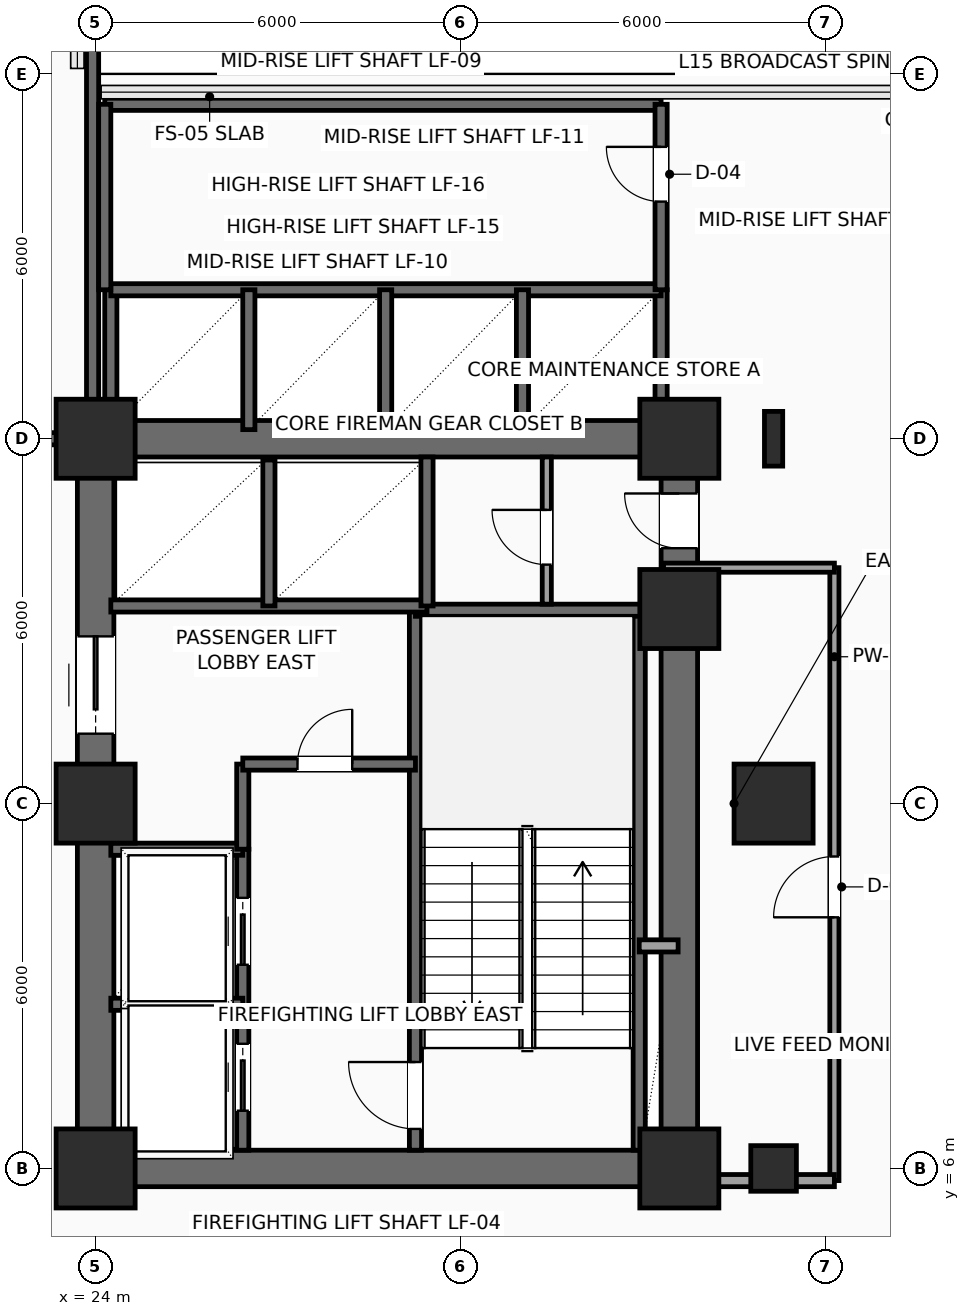
"""IFC4 building model, lengths in metres.
Left out: names, types, materials, properties, quantities, classifications, styles, units other than length and angle.
Written with IfcOpenShell. Run it as: python <this file> out.ifc"""

import sys

from ifc_helpers import new_model, si_unit, direction, frame, frame_2d, origin, origin_2d, place, context, subcontext, project, spatial, rectangle, hollow_rectangle, i_section, extrude, element, fill, save


model = new_model("IFC4")
c1 = context("Model", 3, precision=1e-05, world=origin(), true_north=direction((0.0, 1.0)))
c2 = subcontext(c1, "Body", "Model", "MODEL_VIEW")
j1 = project(units=[si_unit("LENGTHUNIT", "METRE"), si_unit("PLANEANGLEUNIT", "RADIAN")], contexts=[c1])
p1 = place(None, origin())
s1 = spatial("IfcSite", under=j1, at=p1, CompositionType="ELEMENT")
p2 = place(p1, origin())
s2 = spatial("IfcBuilding", under=s1, at=p2, CompositionType="ELEMENT")
p3 = place(p2, frame((0.0, 0.0, 67.5)))
s3 = spatial("IfcBuildingStorey", under=s2, at=p3, CompositionType="ELEMENT", Elevation=67.5)
for number, where, z_axis, x_axis in (
    (1, (24.0, 6.0, 0.0), (0.0, 0.0, 1.0), (1.0, 0.0, 0.0)),
    (2, (24.0, 12.0, 0.0), (0.0, 0.0, 1.0), (1.0, 0.0, 0.0)),
    (3, (24.0, 18.0, 0.0), (0.0, 0.0, 1.0), (1.0, 0.0, 0.0)),
    (4, (33.6, 6.0, 0.0), (0.0, 0.0, 1.0), (1.0, 0.0, 0.0)),
    (5, (33.6, 15.2, 0.0), (0.0, 0.0, 1.0), (1.0, 0.0, 0.0)),
    (6, (33.6, 18.0, 0.0), (0.0, 0.0, 1.0), (1.0, 0.0, 0.0)),
):
    element("IfcColumn", number, at=place(p3, frame(where, z_axis=z_axis, x_axis=x_axis)), inside=s3, PredefinedType="COLUMN", context=c2, shape_type="SweptSolid", body=[
        extrude(rectangle(XDim=1.3, YDim=1.3, at=origin_2d()), origin(), (0.0, 0.0, 1.0), 3.9),
    ])
p4 = place(p3, frame((35.15, 6.0, 0.0), z_axis=(0.0, 0.0, 1.0), x_axis=(1.0, 0.0, 0.0)))
e7 = element("IfcColumn", 7, at=p4, inside=s3, PredefinedType="COLUMN", context=c2, shape_type="SweptSolid", body=[
    extrude(hollow_rectangle(XDim=0.75, YDim=0.75, WallThickness=0.035, InnerFilletRadius=0.035, OuterFilletRadius=0.05, at=origin_2d()), origin(), (0.0, 0.0, 1.0), 3.9),
])
p5 = place(p3, frame((35.15, 12.0, 0.0), z_axis=(0.0, 0.0, 1.0), x_axis=(1.0, 0.0, 0.0)))
e8 = element("IfcColumn", 8, at=p5, inside=s3, PredefinedType="COLUMN", context=c2, shape_type="SweptSolid", body=[
    extrude(rectangle(XDim=1.3, YDim=1.3, at=origin_2d()), origin(), (0.0, 0.0, 1.0), 3.9),
])
p6 = place(p3, frame((35.15, 18.0, 0.0), z_axis=(0.0, 0.0, 1.0), x_axis=(1.0, 0.0, 0.0)))
e9 = element("IfcColumn", 9, at=p6, inside=s3, PredefinedType="COLUMN", context=c2, shape_type="SweptSolid", body=[
    extrude(i_section(OverallWidth=0.3, OverallDepth=0.9, WebThickness=0.019, FlangeThickness=0.035, FilletRadius=0.03, at=origin_2d()), origin(), (0.0, 0.0, 1.0), 3.9),
])
for number, where, z_axis, x_axis in (
    (10, (24.0, 6.0, 0.0), (0.0, 0.0, 1.0), (1.0, 0.0, 0.0)),
    (11, (24.0, 18.0, 0.0), (0.0, 0.0, 1.0), (1.0, 0.0, 0.0)),
):
    element("IfcWall", number, at=place(p3, frame(where, z_axis=z_axis, x_axis=x_axis)), inside=s3, PredefinedType="SHEAR", context=c2, shape_type="SweptSolid", body=[
        extrude(rectangle(XDim=9.6, YDim=0.6, at=frame_2d((4.8, 0.0))), origin(), (0.0, 0.0, 1.0), 3.65),
    ])
p7 = place(p3, frame((24.0, 6.0, 0.0), z_axis=(0.0, 0.0, 1.0), x_axis=(0.0, 1.0, 0.0)))
e12 = element("IfcWall", 12, at=p7, inside=s3, PredefinedType="SHEAR", context=c2, shape_type="SweptSolid", body=[
    extrude(rectangle(XDim=12.0, YDim=0.6, at=frame_2d((6.0, 0.0))), origin(), (0.0, 0.0, 1.0), 3.65),
])
p8 = place(p7, frame((7.15, 0.0, 0.0)))
e13 = element("IfcOpeningElement", 13, at=p8, cuts=e12, PredefinedType="OPENING", context=c2, shape_type="SweptSolid", body=[
    extrude(rectangle(XDim=1.6, YDim=2.3, at=frame_2d((0.8, 1.15))), frame((0.0, 0.31, 0.0), z_axis=(0.0, -1.0, 0.0), x_axis=(1.0, 0.0, 0.0)), (0.0, 0.0, 1.0), 0.62),
])
p9 = place(p3, frame((33.6, 6.0, 0.0), z_axis=(0.0, 0.0, 1.0), x_axis=(0.0, 1.0, 0.0)))
e14 = element("IfcWall", 14, at=p9, inside=s3, PredefinedType="SHEAR", context=c2, shape_type="SweptSolid", body=[
    extrude(rectangle(XDim=12.0, YDim=0.6, at=frame_2d((6.0, 0.0))), origin(), (0.0, 0.0, 1.0), 3.65),
])
p10 = place(p9, frame((10.2, 0.0, 0.0)))
e15 = element("IfcOpeningElement", 15, at=p10, cuts=e14, PredefinedType="OPENING", context=c2, shape_type="SweptSolid", body=[
    extrude(rectangle(XDim=0.9, YDim=2.15, at=frame_2d((0.45, 1.075))), frame((0.0, 0.31, 0.0), z_axis=(0.0, -1.0, 0.0), x_axis=(1.0, 0.0, 0.0)), (0.0, 0.0, 1.0), 0.62),
])
p11 = place(p3, frame((29.26, 6.3, 0.0), z_axis=(0.0, 0.0, 1.0), x_axis=(0.0, 1.0, 0.0)))
e16 = element("IfcWall", 16, at=p11, inside=s3, PredefinedType="SHEAR", context=c2, shape_type="SweptSolid", body=[
    extrude(rectangle(XDim=8.88, YDim=0.2, at=frame_2d((4.44, 0.0))), origin(), (0.0, 0.0, 1.0), 3.65),
])
p12 = place(p11, frame((0.35, 0.0, 0.0)))
e17 = element("IfcOpeningElement", 17, at=p12, cuts=e16, PredefinedType="OPENING", context=c2, shape_type="SweptSolid", body=[
    extrude(rectangle(XDim=1.1, YDim=2.2, at=frame_2d((0.55, 1.1))), frame((0.0, 0.11, 0.0), z_axis=(0.0, -1.0, 0.0), x_axis=(1.0, 0.0, 0.0)), (0.0, 0.0, 1.0), 0.22),
])
p13 = place(p3, frame((32.94, 6.3, 0.0), z_axis=(0.0, 0.0, 1.0), x_axis=(0.0, 1.0, 0.0)))
e18 = element("IfcWall", 18, at=p13, inside=s3, PredefinedType="SHEAR", context=c2, shape_type="SweptSolid", body=[
    extrude(rectangle(XDim=8.88, YDim=0.2, at=frame_2d((4.44, 0.0))), origin(), (0.0, 0.0, 1.0), 3.65),
])
p14 = place(p3, frame((29.26, 15.18, 0.0), z_axis=(0.0, 0.0, 1.0), x_axis=(1.0, 0.0, 0.0)))
e19 = element("IfcWall", 19, at=p14, inside=s3, PredefinedType="SHEAR", context=c2, shape_type="SweptSolid", body=[
    extrude(rectangle(XDim=4.04, YDim=0.2, at=frame_2d((2.02, 0.0))), origin(), (0.0, 0.0, 1.0), 3.65),
])
p15 = place(p3, frame((26.42, 6.3, 0.0), z_axis=(0.0, 0.0, 1.0), x_axis=(0.0, 1.0, 0.0)))
e20 = element("IfcWall", 20, at=p15, inside=s3, PredefinedType="SHEAR", context=c2, shape_type="SweptSolid", body=[
    extrude(rectangle(XDim=4.95, YDim=0.2, at=frame_2d((2.475, 0.0))), origin(), (0.0, 0.0, 1.0), 3.65),
])
p16 = place(p15, frame((0.65, 0.0, 0.0)))
e21 = element("IfcOpeningElement", 21, at=p16, cuts=e20, PredefinedType="OPENING", context=c2, shape_type="SweptSolid", body=[
    extrude(rectangle(XDim=1.1, YDim=2.2, at=frame_2d((0.55, 1.1))), frame((0.0, 0.11, 0.0), z_axis=(0.0, -1.0, 0.0), x_axis=(1.0, 0.0, 0.0)), (0.0, 0.0, 1.0), 0.22),
])
p17 = place(p15, frame((3.05, 0.0, 0.0)))
e22 = element("IfcOpeningElement", 22, at=p17, cuts=e20, PredefinedType="OPENING", context=c2, shape_type="SweptSolid", body=[
    extrude(rectangle(XDim=1.1, YDim=2.2, at=frame_2d((0.55, 1.1))), frame((0.0, 0.11, 0.0), z_axis=(0.0, -1.0, 0.0), x_axis=(1.0, 0.0, 0.0)), (0.0, 0.0, 1.0), 0.22),
])
for number, where, z_axis, x_axis in (
    (23, (24.25, 8.7, 0.0), (0.0, 0.0, 1.0), (1.0, 0.0, 0.0)),
    (24, (24.25, 11.25, 0.0), (0.0, 0.0, 1.0), (1.0, 0.0, 0.0)),
):
    element("IfcWall", number, at=place(p3, frame(where, z_axis=z_axis, x_axis=x_axis)), inside=s3, PredefinedType="SHEAR", context=c2, shape_type="SweptSolid", body=[
        extrude(rectangle(XDim=2.17, YDim=0.2, at=frame_2d((1.085, 0.0))), origin(), (0.0, 0.0, 1.0), 3.65),
    ])
p18 = place(p3, frame((26.42, 11.25, 0.0), z_axis=(0.0, 0.0, 1.0), x_axis=(0.0, 1.0, 0.0)))
e25 = element("IfcWall", 25, at=p18, inside=s3, PredefinedType="SHEAR", context=c2, shape_type="SweptSolid", body=[
    extrude(rectangle(XDim=1.4, YDim=0.2, at=frame_2d((0.7, 0.0))), origin(), (0.0, 0.0, 1.0), 3.65),
])
p19 = place(p3, frame((26.42, 12.65, 0.0), z_axis=(0.0, 0.0, 1.0), x_axis=(1.0, 0.0, 0.0)))
e26 = element("IfcWall", 26, at=p19, inside=s3, PredefinedType="SHEAR", context=c2, shape_type="SweptSolid", body=[
    extrude(rectangle(XDim=2.84, YDim=0.2, at=frame_2d((1.42, 0.0))), origin(), (0.0, 0.0, 1.0), 3.65),
])
p20 = place(p19, frame((0.9, 0.0, 0.0)))
e27 = element("IfcOpeningElement", 27, at=p20, cuts=e26, PredefinedType="OPENING", context=c2, shape_type="SweptSolid", body=[
    extrude(rectangle(XDim=0.9, YDim=2.15, at=frame_2d((0.45, 1.075))), frame((0.0, 0.11, 0.0), z_axis=(0.0, -1.0, 0.0), x_axis=(1.0, 0.0, 0.0)), (0.0, 0.0, 1.0), 0.22),
])
p21 = place(p3, frame((32.94, 9.66, 0.0), z_axis=(0.0, 0.0, 1.0), x_axis=(1.0, 0.0, 0.0)))
e28 = element("IfcWall", 28, at=p21, inside=s3, PredefinedType="SOLIDWALL", context=c2, shape_type="SweptSolid", body=[
    extrude(rectangle(XDim=0.64, YDim=0.2, at=frame_2d((0.32, 0.0))), origin(), (0.0, 0.0, 1.0), 3.65),
])
p22 = place(p3, frame((24.25, 15.25, 0.0), z_axis=(0.0, 0.0, 1.0), x_axis=(1.0, 0.0, 0.0)))
e29 = element("IfcWall", 29, at=p22, inside=s3, PredefinedType="SHEAR", context=c2, shape_type="SweptSolid", body=[
    extrude(rectangle(XDim=5.2, YDim=0.2, at=frame_2d((2.6, 0.0))), origin(), (0.0, 0.0, 1.0), 3.65),
])
p23 = place(p3, frame((26.85, 15.25, 0.0), z_axis=(0.0, 0.0, 1.0), x_axis=(0.0, 1.0, 0.0)))
e30 = element("IfcWall", 30, at=p23, inside=s3, PredefinedType="SHEAR", context=c2, shape_type="SweptSolid", body=[
    extrude(rectangle(XDim=2.4, YDim=0.2, at=frame_2d((1.2, 0.0))), origin(), (0.0, 0.0, 1.0), 3.65),
])
p24 = place(p3, frame((29.45, 15.25, 0.0), z_axis=(0.0, 0.0, 1.0), x_axis=(0.0, 1.0, 0.0)))
e31 = element("IfcWall", 31, at=p24, inside=s3, PredefinedType="SHEAR", context=c2, shape_type="SweptSolid", body=[
    extrude(rectangle(XDim=2.45, YDim=0.2, at=frame_2d((1.225, 0.0))), origin(), (0.0, 0.0, 1.0), 3.65),
])
p25 = place(p3, frame((31.42, 15.28, 0.0), z_axis=(0.0, 0.0, 1.0), x_axis=(0.0, 1.0, 0.0)))
e32 = element("IfcWall", 32, at=p25, inside=s3, PredefinedType="PARTITIONING", context=c2, shape_type="SweptSolid", body=[
    extrude(rectangle(XDim=2.42, YDim=0.15, at=frame_2d((1.21, 0.0))), origin(), (0.0, 0.0, 1.0), 3.65),
])
p26 = place(p25, frame((0.65, 0.0, 0.0)))
e33 = element("IfcOpeningElement", 33, at=p26, cuts=e32, PredefinedType="OPENING", context=c2, shape_type="SweptSolid", body=[
    extrude(rectangle(XDim=0.9, YDim=2.15, at=frame_2d((0.45, 1.075))), frame((0.0, 0.085, 0.0), z_axis=(0.0, -1.0, 0.0), x_axis=(1.0, 0.0, 0.0)), (0.0, 0.0, 1.0), 0.17),
])
p27 = place(p3, frame((20.45, 18.0, 0.0), z_axis=(0.0, 0.0, 1.0), x_axis=(1.0, 0.0, 0.0)))
e34 = element("IfcWall", 34, at=p27, inside=s3, PredefinedType="SHEAR", context=c2, shape_type="SweptSolid", body=[
    extrude(rectangle(XDim=3.5, YDim=0.2, at=frame_2d((1.75, 0.0))), origin(), (0.0, 0.0, 1.0), 3.65),
])
p28 = place(p27, frame((0.95, 0.0, 0.0)))
e35 = element("IfcOpeningElement", 35, at=p28, cuts=e34, PredefinedType="OPENING", context=c2, shape_type="SweptSolid", body=[
    extrude(rectangle(XDim=1.6, YDim=2.3, at=frame_2d((0.8, 1.15))), frame((0.0, 0.11, 0.0), z_axis=(0.0, -1.0, 0.0), x_axis=(1.0, 0.0, 0.0)), (0.0, 0.0, 1.0), 0.22),
])
p29 = place(p3, frame((23.95, 18.0, 0.0), z_axis=(0.0, 0.0, 1.0), x_axis=(0.0, 1.0, 0.0)))
e36 = element("IfcWall", 36, at=p29, inside=s3, PredefinedType="SHEAR", context=c2, shape_type="SweptSolid", body=[
    extrude(rectangle(XDim=9.3, YDim=0.2, at=frame_2d((4.65, 0.0))), origin(), (0.0, 0.0, 1.0), 3.65),
])
for number, where, z_axis, x_axis in (
    (37, (33.3, 18.1, 0.0), (0.0, 0.0, 1.0), (0.0, 1.0, 0.0)),
    (38, (24.25, 18.1, 0.0), (0.0, 0.0, 1.0), (0.0, 1.0, 0.0)),
):
    element("IfcWall", number, at=place(p3, frame(where, z_axis=z_axis, x_axis=x_axis)), inside=s3, PredefinedType="SHEAR", context=c2, shape_type="SweptSolid", body=[
        extrude(rectangle(XDim=2.35, YDim=0.2, at=frame_2d((1.175, 0.0))), origin(), (0.0, 0.0, 1.0), 3.65),
    ])
p30 = place(p3, frame((24.25, 20.45, 0.0), z_axis=(0.0, 0.0, 1.0), x_axis=(1.0, 0.0, 0.0)))
e39 = element("IfcWall", 39, at=p30, inside=s3, PredefinedType="SHEAR", context=c2, shape_type="SweptSolid", body=[
    extrude(rectangle(XDim=9.05, YDim=0.2, at=frame_2d((4.525, 0.0))), origin(), (0.0, 0.0, 1.0), 3.65),
])
for number, where, z_axis, x_axis in (
    (40, (26.52, 18.15, 0.0), (0.0, 0.0, 1.0), (0.0, 1.0, 0.0)),
    (41, (28.77, 18.15, 0.0), (0.0, 0.0, 1.0), (0.0, 1.0, 0.0)),
    (42, (31.02, 18.15, 0.0), (0.0, 0.0, 1.0), (0.0, 1.0, 0.0)),
):
    element("IfcWall", number, at=place(p3, frame(where, z_axis=z_axis, x_axis=x_axis)), inside=s3, PredefinedType="SHEAR", context=c2, shape_type="SweptSolid", body=[
        extrude(rectangle(XDim=2.3, YDim=0.2, at=frame_2d((1.15, 0.0))), origin(), (0.0, 0.0, 1.0), 3.65),
    ])
p31 = place(p3, frame((24.15, 23.5, 0.0), z_axis=(0.0, 0.0, 1.0), x_axis=(1.0, 0.0, 0.0)))
e43 = element("IfcWall", 43, at=p31, inside=s3, PredefinedType="SHEAR", context=c2, shape_type="SweptSolid", body=[
    extrude(rectangle(XDim=9.15, YDim=0.2, at=frame_2d((4.575, 0.0))), origin(), (0.0, 0.0, 1.0), 3.65),
])
p32 = place(p3, frame((33.3, 20.45, 0.0), z_axis=(0.0, 0.0, 1.0), x_axis=(0.0, 1.0, 0.0)))
e44 = element("IfcWall", 44, at=p32, inside=s3, PredefinedType="SHEAR", context=c2, shape_type="SweptSolid", body=[
    extrude(rectangle(XDim=3.05, YDim=0.2, at=frame_2d((1.525, 0.0))), origin(), (0.0, 0.0, 1.0), 3.65),
])
p33 = place(p32, frame((1.45, 0.0, 0.0)))
e45 = element("IfcOpeningElement", 45, at=p33, cuts=e44, PredefinedType="OPENING", context=c2, shape_type="SweptSolid", body=[
    extrude(rectangle(XDim=0.9, YDim=2.15, at=frame_2d((0.45, 1.075))), frame((0.0, 0.11, 0.0), z_axis=(0.0, -1.0, 0.0), x_axis=(1.0, 0.0, 0.0)), (0.0, 0.0, 1.0), 0.22),
])
p34 = place(p3, frame((24.15, 20.45, 0.0), z_axis=(0.0, 0.0, 1.0), x_axis=(0.0, 1.0, 0.0)))
e46 = element("IfcWall", 46, at=p34, inside=s3, PredefinedType="SHEAR", context=c2, shape_type="SweptSolid", body=[
    extrude(rectangle(XDim=3.05, YDim=0.2, at=frame_2d((1.525, 0.0))), origin(), (0.0, 0.0, 1.0), 3.65),
])
p35 = place(p3, frame((36.15, 5.8, 0.0), z_axis=(0.0, 0.0, 1.0), x_axis=(0.0, 1.0, 0.0)))
e47 = element("IfcWall", 47, at=p35, inside=s3, PredefinedType="PARTITIONING", context=c2, shape_type="SweptSolid", body=[
    extrude(rectangle(XDim=10.08, YDim=0.15, at=frame_2d((5.04, 0.0))), origin(), (0.0, 0.0, 1.0), 3.65),
])
p36 = place(p35, frame((4.33, 0.0, 0.0)))
e48 = element("IfcOpeningElement", 48, at=p36, cuts=e47, PredefinedType="OPENING", context=c2, shape_type="SweptSolid", body=[
    extrude(rectangle(XDim=1.0, YDim=2.2, at=frame_2d((0.5, 1.1))), frame((0.0, 0.085, 0.0), z_axis=(0.0, -1.0, 0.0), x_axis=(1.0, 0.0, 0.0)), (0.0, 0.0, 1.0), 0.17),
])
p37 = place(p3, frame((36.15, 15.88, 0.0), z_axis=(0.0, 0.0, 1.0), x_axis=(-1.0, 0.0, 0.0)))
e49 = element("IfcWall", 49, at=p37, inside=s3, PredefinedType="PARTITIONING", context=c2, shape_type="SweptSolid", body=[
    extrude(rectangle(XDim=2.81, YDim=0.15, at=frame_2d((1.405, 0.0))), origin(), (0.0, 0.0, 1.0), 3.65),
])
p38 = place(p3, frame((33.65, 5.8, 0.0), z_axis=(0.0, 0.0, 1.0), x_axis=(1.0, 0.0, 0.0)))
e50 = element("IfcWall", 50, at=p38, inside=s3, PredefinedType="PARTITIONING", context=c2, shape_type="SweptSolid", body=[
    extrude(rectangle(XDim=2.5, YDim=0.2, at=frame_2d((1.25, 0.0))), origin(), (0.0, 0.0, 1.0), 2.992),
])
p39 = place(p8, origin())
e51 = element("IfcDoor", 51, at=p39, inside=s3, OperationType="DOUBLE_DOOR_SLIDING", PredefinedType="DOOR", context=c2, shape_type="SweptSolid", body=[
    extrude(rectangle(XDim=1.6, YDim=2.3, at=frame_2d((0.8, 1.15))), frame((0.0, 0.025, 0.0), z_axis=(0.0, -1.0, 0.0), x_axis=(1.0, 0.0, 0.0)), (0.0, 0.0, 1.0), 0.05),
])
fill(e13, e51)
p40 = place(p10, origin())
e52 = element("IfcDoor", 52, at=p40, inside=s3, OperationType="SINGLE_SWING_RIGHT", PredefinedType="DOOR", context=c2, shape_type="SweptSolid", body=[
    extrude(rectangle(XDim=0.9, YDim=2.15, at=frame_2d((0.45, 1.075))), frame((0.0, 0.025, 0.0), z_axis=(0.0, -1.0, 0.0), x_axis=(1.0, 0.0, 0.0)), (0.0, 0.0, 1.0), 0.05),
])
fill(e15, e52)
p41 = place(p12, origin())
e53 = element("IfcDoor", 53, at=p41, inside=s3, OperationType="SINGLE_SWING_RIGHT", PredefinedType="DOOR", context=c2, shape_type="SweptSolid", body=[
    extrude(rectangle(XDim=1.1, YDim=2.2, at=frame_2d((0.55, 1.1))), frame((0.0, 0.025, 0.0), z_axis=(0.0, -1.0, 0.0), x_axis=(1.0, 0.0, 0.0)), (0.0, 0.0, 1.0), 0.05),
])
fill(e17, e53)
p42 = place(p16, origin())
e54 = element("IfcDoor", 54, at=p42, inside=s3, OperationType="SLIDING_TO_LEFT", PredefinedType="DOOR", context=c2, shape_type="SweptSolid", body=[
    extrude(rectangle(XDim=1.1, YDim=2.2, at=frame_2d((0.55, 1.1))), frame((0.0, 0.025, 0.0), z_axis=(0.0, -1.0, 0.0), x_axis=(1.0, 0.0, 0.0)), (0.0, 0.0, 1.0), 0.05),
])
fill(e21, e54)
p43 = place(p17, origin())
e55 = element("IfcDoor", 55, at=p43, inside=s3, OperationType="SLIDING_TO_LEFT", PredefinedType="DOOR", context=c2, shape_type="SweptSolid", body=[
    extrude(rectangle(XDim=1.1, YDim=2.2, at=frame_2d((0.55, 1.1))), frame((0.0, 0.025, 0.0), z_axis=(0.0, -1.0, 0.0), x_axis=(1.0, 0.0, 0.0)), (0.0, 0.0, 1.0), 0.05),
])
fill(e22, e55)
p44 = place(p20, origin())
e56 = element("IfcDoor", 56, at=p44, inside=s3, OperationType="SINGLE_SWING_RIGHT", PredefinedType="DOOR", context=c2, shape_type="SweptSolid", body=[
    extrude(rectangle(XDim=0.9, YDim=2.15, at=frame_2d((0.45, 1.075))), frame((0.0, 0.025, 0.0), z_axis=(0.0, -1.0, 0.0), x_axis=(1.0, 0.0, 0.0)), (0.0, 0.0, 1.0), 0.05),
])
fill(e27, e56)
p45 = place(p26, origin())
e57 = element("IfcDoor", 57, at=p45, inside=s3, OperationType="SINGLE_SWING_RIGHT", PredefinedType="DOOR", context=c2, shape_type="SweptSolid", body=[
    extrude(rectangle(XDim=0.9, YDim=2.15, at=frame_2d((0.45, 1.075))), frame((0.0, 0.025, 0.0), z_axis=(0.0, -1.0, 0.0), x_axis=(1.0, 0.0, 0.0)), (0.0, 0.0, 1.0), 0.05),
])
fill(e33, e57)
p46 = place(p33, origin())
e58 = element("IfcDoor", 58, at=p46, inside=s3, OperationType="SINGLE_SWING_RIGHT", PredefinedType="DOOR", context=c2, shape_type="SweptSolid", body=[
    extrude(rectangle(XDim=0.9, YDim=2.15, at=frame_2d((0.45, 1.075))), frame((0.0, 0.025, 0.0), z_axis=(0.0, -1.0, 0.0), x_axis=(1.0, 0.0, 0.0)), (0.0, 0.0, 1.0), 0.05),
])
fill(e45, e58)
p47 = place(p36, origin())
e59 = element("IfcDoor", 59, at=p47, inside=s3, OperationType="SINGLE_SWING_LEFT", PredefinedType="DOOR", context=c2, shape_type="SweptSolid", body=[
    extrude(rectangle(XDim=1.0, YDim=2.2, at=frame_2d((0.5, 1.1))), frame((0.0, 0.025, 0.0), z_axis=(0.0, -1.0, 0.0), x_axis=(1.0, 0.0, 0.0)), (0.0, 0.0, 1.0), 0.05),
])
fill(e48, e59)
save(model, sys.argv[1])
